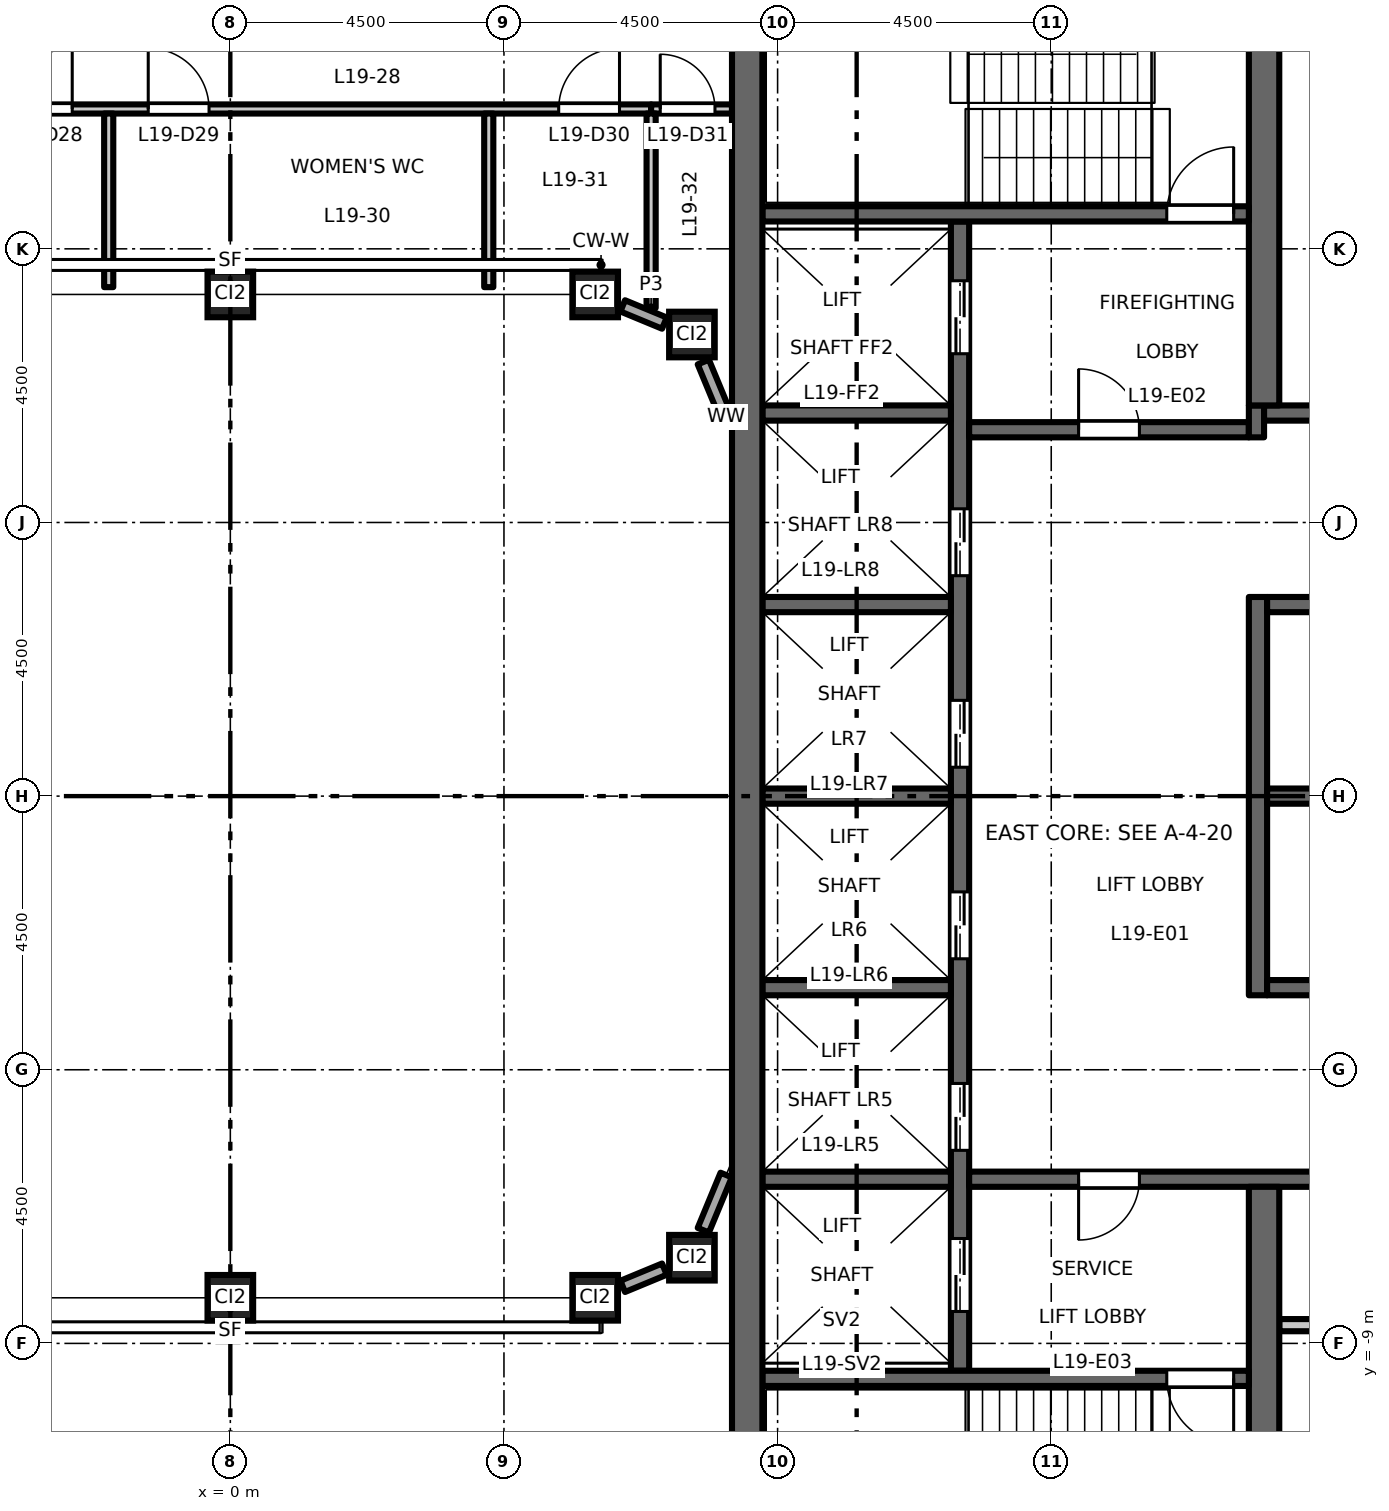
"""IFC4 building model, lengths in metres.
Left out: names, types, materials, properties, quantities, classifications, styles, units other than length and angle.
Written with IfcOpenShell. Run it as: python <this file> out.ifc"""

import sys

from ifc_helpers import new_model, si_unit, direction, frame, frame_2d, origin, origin_2d, place, context, subcontext, project, spatial, rectangle, hollow_rectangle, extrude, element, fill, save


model = new_model("IFC4")
c1 = context("Model", 3, precision=1e-05, world=origin(), true_north=direction((0.0, 1.0)))
c2 = subcontext(c1, "Body", "Model", "MODEL_VIEW")
j1 = project(units=[si_unit("LENGTHUNIT", "METRE"), si_unit("PLANEANGLEUNIT", "RADIAN")], contexts=[c1])
p1 = place(None, origin())
s1 = spatial("IfcSite", under=j1, at=p1, CompositionType="ELEMENT")
p2 = place(p1, origin())
s2 = spatial("IfcBuilding", under=s1, at=p2, CompositionType="ELEMENT")
p3 = place(p2, frame((0.0, 0.0, 89.7)))
s3 = spatial("IfcBuildingStorey", under=s2, at=p3, CompositionType="ELEMENT", Elevation=89.7)
for number, where, z_axis, x_axis in (
    (1, (0.0, -8.25, 0.0), (0.0, 0.0, 1.0), (1.0, 0.0, 0.0)),
    (2, (6.0, -8.25, 0.0), (0.0, 0.0, 1.0), (1.0, 0.0, 0.0)),
    (3, (7.591, -7.591, 0.0), (0.0, 0.0, 1.0), (1.0, 0.0, 0.0)),
    (4, (0.0, 8.25, 0.0), (0.0, 0.0, 1.0), (1.0, 0.0, 0.0)),
    (5, (6.0, 8.25, 0.0), (0.0, 0.0, 1.0), (1.0, 0.0, 0.0)),
    (6, (7.591, 7.591, 0.0), (0.0, 0.0, 1.0), (1.0, 0.0, 0.0)),
):
    element("IfcColumn", number, at=place(p3, frame(where, z_axis=z_axis, x_axis=x_axis)), inside=s3, PredefinedType="COLUMN", context=c2, shape_type="SweptSolid", body=[
        extrude(hollow_rectangle(XDim=0.75, YDim=0.75, WallThickness=0.045, at=origin_2d()), origin(), (0.0, 0.0, 1.0), 4.5),
    ])
p4 = place(p3, frame((12.0, -9.45, 0.0), z_axis=(0.0, 0.0, 1.0), x_axis=(0.0, 1.0, 0.0)))
e7 = element("IfcWall", 7, at=p4, inside=s3, PredefinedType="SHEAR", context=c2, shape_type="SweptSolid", body=[
    extrude(rectangle(XDim=18.9, YDim=0.3, at=frame_2d((9.45, 0.0))), origin(), (0.0, 0.0, 1.0), 4.3),
])
p5 = place(p4, frame((3.625, 0.0, 0.0)))
e8 = element("IfcOpeningElement", 8, at=p5, cuts=e7, PredefinedType="OPENING", context=c2, shape_type="SweptSolid", body=[
    extrude(rectangle(XDim=1.1, YDim=2.1, at=frame_2d((0.55, 1.05))), frame((0.0, 0.16, 0.0), z_axis=(0.0, -1.0, 0.0), x_axis=(1.0, 0.0, 0.0)), (0.0, 0.0, 1.0), 0.32),
])
p6 = place(p4, frame((6.775, 0.0, 0.0)))
e9 = element("IfcOpeningElement", 9, at=p6, cuts=e7, PredefinedType="OPENING", context=c2, shape_type="SweptSolid", body=[
    extrude(rectangle(XDim=1.1, YDim=2.1, at=frame_2d((0.55, 1.05))), frame((0.0, 0.16, 0.0), z_axis=(0.0, -1.0, 0.0), x_axis=(1.0, 0.0, 0.0)), (0.0, 0.0, 1.0), 0.32),
])
p7 = place(p4, frame((9.925, 0.0, 0.0)))
e10 = element("IfcOpeningElement", 10, at=p7, cuts=e7, PredefinedType="OPENING", context=c2, shape_type="SweptSolid", body=[
    extrude(rectangle(XDim=1.1, YDim=2.1, at=frame_2d((0.55, 1.05))), frame((0.0, 0.16, 0.0), z_axis=(0.0, -1.0, 0.0), x_axis=(1.0, 0.0, 0.0)), (0.0, 0.0, 1.0), 0.32),
])
p8 = place(p4, frame((13.075, 0.0, 0.0)))
e11 = element("IfcOpeningElement", 11, at=p8, cuts=e7, PredefinedType="OPENING", context=c2, shape_type="SweptSolid", body=[
    extrude(rectangle(XDim=1.1, YDim=2.1, at=frame_2d((0.55, 1.05))), frame((0.0, 0.16, 0.0), z_axis=(0.0, -1.0, 0.0), x_axis=(1.0, 0.0, 0.0)), (0.0, 0.0, 1.0), 0.32),
])
p9 = place(p4, frame((16.725, 0.0, 0.0)))
e12 = element("IfcOpeningElement", 12, at=p9, cuts=e7, PredefinedType="OPENING", context=c2, shape_type="SweptSolid", body=[
    extrude(rectangle(XDim=1.2, YDim=2.1, at=frame_2d((0.6, 1.05))), frame((0.0, 0.16, 0.0), z_axis=(0.0, -1.0, 0.0), x_axis=(1.0, 0.0, 0.0)), (0.0, 0.0, 1.0), 0.32),
])
p10 = place(p4, frame((0.975, 0.0, 0.0)))
e13 = element("IfcOpeningElement", 13, at=p10, cuts=e7, PredefinedType="OPENING", context=c2, shape_type="SweptSolid", body=[
    extrude(rectangle(XDim=1.2, YDim=2.1, at=frame_2d((0.6, 1.05))), frame((0.0, 0.16, 0.0), z_axis=(0.0, -1.0, 0.0), x_axis=(1.0, 0.0, 0.0)), (0.0, 0.0, 1.0), 0.32),
])
p11 = place(p3, frame((12.15, 6.025, 0.0), z_axis=(0.0, 0.0, 1.0), x_axis=(1.0, 0.0, 0.0)))
e14 = element("IfcWall", 14, at=p11, inside=s3, PredefinedType="SHEAR", context=c2, shape_type="SweptSolid", body=[
    extrude(rectangle(XDim=4.6, YDim=0.25, at=frame_2d((2.3, 0.0))), origin(), (0.0, 0.0, 1.0), 4.3),
])
p12 = place(p11, frame((1.8, 0.0, 0.0)))
e15 = element("IfcOpeningElement", 15, at=p12, cuts=e14, PredefinedType="OPENING", context=c2, shape_type="SweptSolid", body=[
    extrude(rectangle(XDim=1.0, YDim=2.1, at=frame_2d((0.5, 1.05))), frame((0.0, 0.135, 0.0), z_axis=(0.0, -1.0, 0.0), x_axis=(1.0, 0.0, 0.0)), (0.0, 0.0, 1.0), 0.27),
])
p13 = place(p3, frame((16.875, 5.9, 0.0), z_axis=(0.0, 0.0, 1.0), x_axis=(0.0, 1.0, 0.0)))
e16 = element("IfcWall", 16, at=p13, inside=s3, PredefinedType="SHEAR", context=c2, shape_type="SweptSolid", body=[
    extrude(rectangle(XDim=0.525, YDim=0.25, at=frame_2d((0.263, 0.0))), origin(), (0.0, 0.0, 1.0), 4.3),
])
p14 = place(p3, frame((17.0, 6.3, 0.0), z_axis=(0.0, 0.0, 1.0), x_axis=(1.0, 0.0, 0.0)))
e17 = element("IfcWall", 17, at=p14, inside=s3, PredefinedType="SHEAR", context=c2, shape_type="SweptSolid", body=[
    extrude(rectangle(XDim=4.25, YDim=0.25, at=frame_2d((2.125, 0.0))), origin(), (0.0, 0.0, 1.0), 4.3),
])
p15 = place(p3, frame((12.15, -6.3, 0.0), z_axis=(0.0, 0.0, 1.0), x_axis=(1.0, 0.0, 0.0)))
e18 = element("IfcWall", 18, at=p15, inside=s3, PredefinedType="SHEAR", context=c2, shape_type="SweptSolid", body=[
    extrude(rectangle(XDim=9.1, YDim=0.25, at=frame_2d((4.55, 0.0))), origin(), (0.0, 0.0, 1.0), 4.3),
])
p16 = place(p15, frame((1.8, 0.0, 0.0)))
e19 = element("IfcOpeningElement", 19, at=p16, cuts=e18, PredefinedType="OPENING", context=c2, shape_type="SweptSolid", body=[
    extrude(rectangle(XDim=1.0, YDim=2.1, at=frame_2d((0.5, 1.05))), frame((0.0, 0.135, 0.0), z_axis=(0.0, -1.0, 0.0), x_axis=(1.0, 0.0, 0.0)), (0.0, 0.0, 1.0), 0.27),
])
p17 = place(p15, frame((6.15, 0.0, 0.0)))
e20 = element("IfcOpeningElement", 20, at=p17, cuts=e18, PredefinedType="OPENING", context=c2, shape_type="SweptSolid", body=[
    extrude(rectangle(XDim=0.9, YDim=2.1, at=frame_2d((0.45, 1.05))), frame((0.0, 0.135, 0.0), z_axis=(0.0, -1.0, 0.0), x_axis=(1.0, 0.0, 0.0)), (0.0, 0.0, 1.0), 0.27),
])
p18 = place(p3, frame((17.25, -8.7, 0.0), z_axis=(0.0, 0.0, 1.0), x_axis=(1.0, 0.0, 0.0)))
e21 = element("IfcWall", 21, at=p18, inside=s3, PredefinedType="PARTITIONING", context=c2, shape_type="SweptSolid", body=[
    extrude(rectangle(XDim=4.0, YDim=0.2, at=frame_2d((2.0, 0.0))), origin(), (0.0, 0.0, 1.0), 4.3),
])
p19 = place(p3, frame((16.9, -3.275, 0.0), z_axis=(0.0, 0.0, 1.0), x_axis=(0.0, 1.0, 0.0)))
e22 = element("IfcWall", 22, at=p19, inside=s3, PredefinedType="SHEAR", context=c2, shape_type="SweptSolid", body=[
    extrude(rectangle(XDim=6.55, YDim=0.3, at=frame_2d((3.275, 0.0))), origin(), (0.0, 0.0, 1.0), 4.3),
])
for number, where, z_axis, x_axis in (
    (23, (17.05, 0.0, 0.0), (0.0, 0.0, 1.0), (1.0, 0.0, 0.0)),
    (24, (17.05, 3.15, 0.0), (0.0, 0.0, 1.0), (1.0, 0.0, 0.0)),
    (25, (17.05, -3.15, 0.0), (0.0, 0.0, 1.0), (1.0, 0.0, 0.0)),
):
    element("IfcWall", number, at=place(p3, frame(where, z_axis=z_axis, x_axis=x_axis)), inside=s3, PredefinedType="SHEAR", context=c2, shape_type="SweptSolid", body=[
        extrude(rectangle(XDim=4.2, YDim=0.25, at=frame_2d((2.1, 0.0))), origin(), (0.0, 0.0, 1.0), 4.3),
    ])
for number, where, z_axis, x_axis in (
    (26, (17.0, 6.425, 0.0), (0.0, 0.0, 1.0), (0.0, 1.0, 0.0)),
    (27, (17.0, -13.0, 0.0), (0.0, 0.0, 1.0), (0.0, 1.0, 0.0)),
):
    element("IfcWall", number, at=place(p3, frame(where, z_axis=z_axis, x_axis=x_axis)), inside=s3, PredefinedType="SHEAR", context=c2, shape_type="SweptSolid", body=[
        extrude(rectangle(XDim=6.575, YDim=0.5, at=frame_2d((3.288, 0.0))), origin(), (0.0, 0.0, 1.0), 4.3),
    ])
for number, where, z_axis, x_axis in (
    (28, (8.75, 0.0, 0.0), (0.0, 0.0, 1.0), (1.0, 0.0, 0.0)),
    (29, (8.75, 3.15, 0.0), (0.0, 0.0, 1.0), (1.0, 0.0, 0.0)),
    (30, (8.75, 6.3, 0.0), (0.0, 0.0, 1.0), (1.0, 0.0, 0.0)),
    (31, (8.75, -3.15, 0.0), (0.0, 0.0, 1.0), (1.0, 0.0, 0.0)),
    (32, (8.75, -6.3, 0.0), (0.0, 0.0, 1.0), (1.0, 0.0, 0.0)),
):
    element("IfcWall", number, at=place(p3, frame(where, z_axis=z_axis, x_axis=x_axis)), inside=s3, PredefinedType="SHEAR", context=c2, shape_type="SweptSolid", body=[
        extrude(rectangle(XDim=3.1, YDim=0.25, at=frame_2d((1.55, 0.0))), origin(), (0.0, 0.0, 1.0), 4.3),
    ])
p20 = place(p3, frame((8.75, 9.575, 0.0), z_axis=(0.0, 0.0, 1.0), x_axis=(1.0, 0.0, 0.0)))
e33 = element("IfcWall", 33, at=p20, inside=s3, PredefinedType="SHEAR", context=c2, shape_type="SweptSolid", body=[
    extrude(rectangle(XDim=8.0, YDim=0.25, at=frame_2d((4.0, 0.0))), origin(), (0.0, 0.0, 1.0), 4.3),
])
p21 = place(p20, frame((6.65, 0.0, 0.0)))
e34 = element("IfcOpeningElement", 34, at=p21, cuts=e33, PredefinedType="OPENING", context=c2, shape_type="SweptSolid", body=[
    extrude(rectangle(XDim=1.1, YDim=2.1, at=frame_2d((0.55, 1.05))), frame((0.0, 0.135, 0.0), z_axis=(0.0, -1.0, 0.0), x_axis=(1.0, 0.0, 0.0)), (0.0, 0.0, 1.0), 0.27),
])
p22 = place(p3, frame((8.75, -9.575, 0.0), z_axis=(0.0, 0.0, 1.0), x_axis=(1.0, 0.0, 0.0)))
e35 = element("IfcWall", 35, at=p22, inside=s3, PredefinedType="SHEAR", context=c2, shape_type="SweptSolid", body=[
    extrude(rectangle(XDim=8.0, YDim=0.25, at=frame_2d((4.0, 0.0))), origin(), (0.0, 0.0, 1.0), 4.3),
])
p23 = place(p22, frame((6.65, 0.0, 0.0)))
e36 = element("IfcOpeningElement", 36, at=p23, cuts=e35, PredefinedType="OPENING", context=c2, shape_type="SweptSolid", body=[
    extrude(rectangle(XDim=1.1, YDim=2.1, at=frame_2d((0.55, 1.05))), frame((0.0, 0.135, 0.0), z_axis=(0.0, -1.0, 0.0), x_axis=(1.0, 0.0, 0.0)), (0.0, 0.0, 1.0), 0.27),
])
p24 = place(p3, frame((8.5, -13.0, 0.0), z_axis=(0.0, 0.0, 1.0), x_axis=(0.0, 1.0, 0.0)))
e37 = element("IfcWall", 37, at=p24, inside=s3, PredefinedType="SHEAR", context=c2, shape_type="SweptSolid", body=[
    extrude(rectangle(XDim=26.0, YDim=0.5, at=frame_2d((13.0, 0.0))), origin(), (0.0, 0.0, 1.0), 4.3),
])
p25 = place(p3, frame((6.453, -8.062, 0.0), z_axis=(0.0, 0.0, 1.0), x_axis=(0.923940677943, 0.382535780864, 0.0)))
e38 = element("IfcWall", 38, at=p25, inside=s3, PredefinedType="STANDARD", context=c2, shape_type="SweptSolid", body=[
    extrude(rectangle(XDim=0.742, YDim=0.2, at=frame_2d((0.371, 0.0))), origin(), (0.0, 0.0, 1.0), 3.68),
])
for number, where, z_axis, x_axis in (
    (39, (7.779, -7.138, 0.0), (0.0, 0.0, 1.0), (0.383, 0.924, 0.0)),
    (40, (8.154, 6.231, 0.0), (0.0, 0.0, 1.0), (-0.383, 0.924, 0.0)),
):
    element("IfcWall", number, at=place(p3, frame(where, z_axis=z_axis, x_axis=x_axis)), inside=s3, PredefinedType="STANDARD", context=c2, shape_type="SweptSolid", body=[
        extrude(rectangle(XDim=0.982, YDim=0.2, at=frame_2d((0.491, 0.0))), origin(), (0.0, 0.0, 1.0), 3.68),
    ])
p26 = place(p3, frame((7.138, 7.779, 0.0), z_axis=(0.0, 0.0, 1.0), x_axis=(-0.923940677943, 0.382535780864, 0.0)))
e41 = element("IfcWall", 41, at=p26, inside=s3, PredefinedType="STANDARD", context=c2, shape_type="SweptSolid", body=[
    extrude(rectangle(XDim=0.742, YDim=0.2, at=frame_2d((0.371, 0.0))), origin(), (0.0, 0.0, 1.0), 3.68),
])
p27 = place(p3, frame((-8.25, 11.3, 0.0), z_axis=(0.0, 0.0, 1.0), x_axis=(1.0, 0.0, 0.0)))
e42 = element("IfcWall", 42, at=p27, inside=s3, PredefinedType="PARTITIONING", context=c2, shape_type="SweptSolid", body=[
    extrude(rectangle(XDim=15.17, YDim=0.15, at=frame_2d((7.585, 0.0))), origin(), (0.0, 0.0, 1.0), 4.3),
])
p28 = place(p27, frame((4.65, 0.0, 0.0)))
e43 = element("IfcOpeningElement", 43, at=p28, cuts=e42, PredefinedType="OPENING", context=c2, shape_type="SweptSolid", body=[
    extrude(rectangle(XDim=1.0, YDim=2.1, at=frame_2d((0.5, 1.05))), frame((0.0, 0.085, 0.0), z_axis=(0.0, -1.0, 0.0), x_axis=(1.0, 0.0, 0.0)), (0.0, 0.0, 1.0), 0.17),
])
p29 = place(p27, frame((6.9, 0.0, 0.0)))
e44 = element("IfcOpeningElement", 44, at=p29, cuts=e42, PredefinedType="OPENING", context=c2, shape_type="SweptSolid", body=[
    extrude(rectangle(XDim=1.0, YDim=2.1, at=frame_2d((0.5, 1.05))), frame((0.0, 0.085, 0.0), z_axis=(0.0, -1.0, 0.0), x_axis=(1.0, 0.0, 0.0)), (0.0, 0.0, 1.0), 0.17),
])
p30 = place(p27, frame((13.65, 0.0, 0.0)))
e45 = element("IfcOpeningElement", 45, at=p30, cuts=e42, PredefinedType="OPENING", context=c2, shape_type="SweptSolid", body=[
    extrude(rectangle(XDim=1.0, YDim=2.1, at=frame_2d((0.5, 1.05))), frame((0.0, 0.085, 0.0), z_axis=(0.0, -1.0, 0.0), x_axis=(1.0, 0.0, 0.0)), (0.0, 0.0, 1.0), 0.17),
])
p31 = place(p3, frame((6.92, 11.3, 0.0), z_axis=(0.0, 0.0, 1.0), x_axis=(1.0, 0.0, 0.0)))
e46 = element("IfcWall", 46, at=p31, inside=s3, PredefinedType="PARTITIONING", context=c2, shape_type="SweptSolid", body=[
    extrude(rectangle(XDim=1.33, YDim=0.15, at=frame_2d((0.665, 0.0))), origin(), (0.0, 0.0, 1.0), 4.3),
])
p32 = place(p31, frame((0.15, 0.0, 0.0)))
e47 = element("IfcOpeningElement", 47, at=p32, cuts=e46, PredefinedType="OPENING", context=c2, shape_type="SweptSolid", body=[
    extrude(rectangle(XDim=0.9, YDim=2.1, at=frame_2d((0.45, 1.05))), frame((0.0, 0.085, 0.0), z_axis=(0.0, -1.0, 0.0), x_axis=(1.0, 0.0, 0.0)), (0.0, 0.0, 1.0), 0.17),
])
for number, where, z_axis, x_axis in (
    (48, (-2.0, 8.37, 0.0), (0.0, 0.0, 1.0), (0.0, 1.0, 0.0)),
    (49, (4.25, 8.37, 0.0), (0.0, 0.0, 1.0), (0.0, 1.0, 0.0)),
):
    element("IfcWall", number, at=place(p3, frame(where, z_axis=z_axis, x_axis=x_axis)), inside=s3, PredefinedType="PARTITIONING", context=c2, shape_type="SweptSolid", body=[
        extrude(rectangle(XDim=2.855, YDim=0.15, at=frame_2d((1.427, 0.0))), origin(), (0.0, 0.0, 1.0), 4.3),
    ])
p33 = place(p3, frame((6.92, 8.028, 0.0), z_axis=(0.0, 0.0, 1.0), x_axis=(0.0, 1.0, 0.0)))
e50 = element("IfcWall", 50, at=p33, inside=s3, PredefinedType="PARTITIONING", context=c2, shape_type="SweptSolid", body=[
    extrude(rectangle(XDim=3.197, YDim=0.15, at=frame_2d((1.599, 0.0))), origin(), (0.0, 0.0, 1.0), 4.3),
])
p34 = place(p12, origin())
e51 = element("IfcDoor", 51, at=p34, inside=s3, OperationType="SINGLE_SWING_RIGHT", PredefinedType="DOOR", context=c2, shape_type="SweptSolid", body=[
    extrude(rectangle(XDim=1.0, YDim=2.1, at=frame_2d((0.5, 1.05))), frame((0.0, 0.025, 0.0), z_axis=(0.0, -1.0, 0.0), x_axis=(1.0, 0.0, 0.0)), (0.0, 0.0, 1.0), 0.05),
])
fill(e15, e51)
p35 = place(p16, origin())
e52 = element("IfcDoor", 52, at=p35, inside=s3, OperationType="SINGLE_SWING_LEFT", PredefinedType="DOOR", context=c2, shape_type="SweptSolid", body=[
    extrude(rectangle(XDim=1.0, YDim=2.1, at=frame_2d((0.5, 1.05))), frame((0.0, 0.025, 0.0), z_axis=(0.0, -1.0, 0.0), x_axis=(1.0, 0.0, 0.0)), (0.0, 0.0, 1.0), 0.05),
])
fill(e19, e52)
p36 = place(p21, origin())
e53 = element("IfcDoor", 53, at=p36, inside=s3, OperationType="SINGLE_SWING_LEFT", PredefinedType="DOOR", context=c2, shape_type="SweptSolid", body=[
    extrude(rectangle(XDim=1.1, YDim=2.1, at=frame_2d((0.55, 1.05))), frame((0.0, 0.025, 0.0), z_axis=(0.0, -1.0, 0.0), x_axis=(1.0, 0.0, 0.0)), (0.0, 0.0, 1.0), 0.05),
])
fill(e34, e53)
p37 = place(p23, origin())
e54 = element("IfcDoor", 54, at=p37, inside=s3, OperationType="SINGLE_SWING_RIGHT", PredefinedType="DOOR", context=c2, shape_type="SweptSolid", body=[
    extrude(rectangle(XDim=1.1, YDim=2.1, at=frame_2d((0.55, 1.05))), frame((0.0, 0.025, 0.0), z_axis=(0.0, -1.0, 0.0), x_axis=(1.0, 0.0, 0.0)), (0.0, 0.0, 1.0), 0.05),
])
fill(e36, e54)
p38 = place(p5, origin())
e55 = element("IfcDoor", 55, at=p38, inside=s3, OperationType="DOUBLE_DOOR_SLIDING", PredefinedType="DOOR", context=c2, shape_type="SweptSolid", body=[
    extrude(rectangle(XDim=1.1, YDim=2.1, at=frame_2d((0.55, 1.05))), frame((0.0, 0.025, 0.0), z_axis=(0.0, -1.0, 0.0), x_axis=(1.0, 0.0, 0.0)), (0.0, 0.0, 1.0), 0.05),
])
fill(e8, e55)
p39 = place(p6, origin())
e56 = element("IfcDoor", 56, at=p39, inside=s3, OperationType="DOUBLE_DOOR_SLIDING", PredefinedType="DOOR", context=c2, shape_type="SweptSolid", body=[
    extrude(rectangle(XDim=1.1, YDim=2.1, at=frame_2d((0.55, 1.05))), frame((0.0, 0.025, 0.0), z_axis=(0.0, -1.0, 0.0), x_axis=(1.0, 0.0, 0.0)), (0.0, 0.0, 1.0), 0.05),
])
fill(e9, e56)
p40 = place(p7, origin())
e57 = element("IfcDoor", 57, at=p40, inside=s3, OperationType="DOUBLE_DOOR_SLIDING", PredefinedType="DOOR", context=c2, shape_type="SweptSolid", body=[
    extrude(rectangle(XDim=1.1, YDim=2.1, at=frame_2d((0.55, 1.05))), frame((0.0, 0.025, 0.0), z_axis=(0.0, -1.0, 0.0), x_axis=(1.0, 0.0, 0.0)), (0.0, 0.0, 1.0), 0.05),
])
fill(e10, e57)
p41 = place(p8, origin())
e58 = element("IfcDoor", 58, at=p41, inside=s3, OperationType="DOUBLE_DOOR_SLIDING", PredefinedType="DOOR", context=c2, shape_type="SweptSolid", body=[
    extrude(rectangle(XDim=1.1, YDim=2.1, at=frame_2d((0.55, 1.05))), frame((0.0, 0.025, 0.0), z_axis=(0.0, -1.0, 0.0), x_axis=(1.0, 0.0, 0.0)), (0.0, 0.0, 1.0), 0.05),
])
fill(e11, e58)
p42 = place(p9, origin())
e59 = element("IfcDoor", 59, at=p42, inside=s3, OperationType="DOUBLE_DOOR_SLIDING", PredefinedType="DOOR", context=c2, shape_type="SweptSolid", body=[
    extrude(rectangle(XDim=1.2, YDim=2.1, at=frame_2d((0.6, 1.05))), frame((0.0, 0.025, 0.0), z_axis=(0.0, -1.0, 0.0), x_axis=(1.0, 0.0, 0.0)), (0.0, 0.0, 1.0), 0.05),
])
fill(e12, e59)
p43 = place(p10, origin())
e60 = element("IfcDoor", 60, at=p43, inside=s3, OperationType="DOUBLE_DOOR_SLIDING", PredefinedType="DOOR", context=c2, shape_type="SweptSolid", body=[
    extrude(rectangle(XDim=1.2, YDim=2.1, at=frame_2d((0.6, 1.05))), frame((0.0, 0.025, 0.0), z_axis=(0.0, -1.0, 0.0), x_axis=(1.0, 0.0, 0.0)), (0.0, 0.0, 1.0), 0.05),
])
fill(e13, e60)
p44 = place(p28, origin())
e61 = element("IfcDoor", 61, at=p44, inside=s3, OperationType="SINGLE_SWING_RIGHT", PredefinedType="DOOR", context=c2, shape_type="SweptSolid", body=[
    extrude(rectangle(XDim=1.0, YDim=2.1, at=frame_2d((0.5, 1.05))), frame((0.0, 0.025, 0.0), z_axis=(0.0, -1.0, 0.0), x_axis=(1.0, 0.0, 0.0)), (0.0, 0.0, 1.0), 0.05),
])
fill(e43, e61)
p45 = place(p29, origin())
e62 = element("IfcDoor", 62, at=p45, inside=s3, OperationType="SINGLE_SWING_LEFT", PredefinedType="DOOR", context=c2, shape_type="SweptSolid", body=[
    extrude(rectangle(XDim=1.0, YDim=2.1, at=frame_2d((0.5, 1.05))), frame((0.0, 0.025, 0.0), z_axis=(0.0, -1.0, 0.0), x_axis=(1.0, 0.0, 0.0)), (0.0, 0.0, 1.0), 0.05),
])
fill(e44, e62)
p46 = place(p30, origin())
e63 = element("IfcDoor", 63, at=p46, inside=s3, OperationType="SINGLE_SWING_RIGHT", PredefinedType="DOOR", context=c2, shape_type="SweptSolid", body=[
    extrude(rectangle(XDim=1.0, YDim=2.1, at=frame_2d((0.5, 1.05))), frame((0.0, 0.025, 0.0), z_axis=(0.0, -1.0, 0.0), x_axis=(1.0, 0.0, 0.0)), (0.0, 0.0, 1.0), 0.05),
])
fill(e45, e63)
p47 = place(p32, origin())
e64 = element("IfcDoor", 64, at=p47, inside=s3, OperationType="SINGLE_SWING_LEFT", PredefinedType="DOOR", context=c2, shape_type="SweptSolid", body=[
    extrude(rectangle(XDim=0.9, YDim=2.1, at=frame_2d((0.45, 1.05))), frame((0.0, 0.025, 0.0), z_axis=(0.0, -1.0, 0.0), x_axis=(1.0, 0.0, 0.0)), (0.0, 0.0, 1.0), 0.05),
])
fill(e47, e64)
save(model, sys.argv[1])
